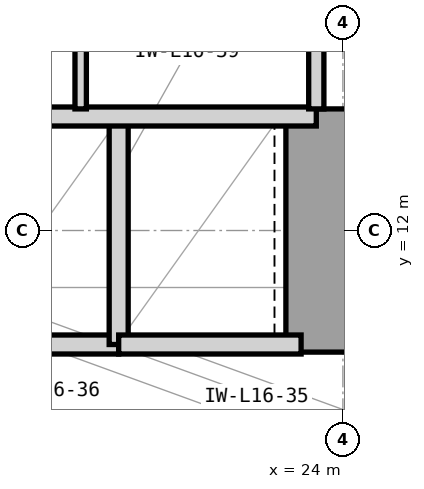
"""IFC4 building model, lengths in metres.
Left out: names, types, materials, properties, quantities, classifications, styles, units other than length and angle.
Written with IfcOpenShell. Run it as: python <this file> out.ifc"""

import sys

from ifc_helpers import new_model, si_unit, direction, frame, frame_2d, origin, place, context, subcontext, project, spatial, rectangle, extrude, element, save


model = new_model("IFC4")
c1 = context("Model", 3, precision=1e-05, world=origin(), true_north=direction((0.0, 1.0)))
c2 = subcontext(c1, "Body", "Model", "MODEL_VIEW")
j1 = project(units=[si_unit("LENGTHUNIT", "METRE"), si_unit("PLANEANGLEUNIT", "RADIAN")], contexts=[c1])
p1 = place(None, origin())
s1 = spatial("IfcSite", under=j1, at=p1, CompositionType="ELEMENT")
p2 = place(p1, origin())
s2 = spatial("IfcBuilding", under=s1, at=p2, CompositionType="ELEMENT")
p3 = place(p2, frame((0.0, 0.0, 72.0)))
s3 = spatial("IfcBuildingStorey", under=s2, at=p3, CompositionType="ELEMENT", Elevation=72.0)
p4 = place(p3, frame((23.65, 10.4, 0.0), z_axis=(0.0, 0.0, 1.0), x_axis=(0.0, 1.0, 0.0)))
e1 = element("IfcWall", 1, at=p4, inside=s3, PredefinedType="SHEAR", context=c2, shape_type="SweptSolid", body=[
    extrude(rectangle(XDim=3.2, YDim=0.8, at=frame_2d((1.6, 0.0))), origin(), (0.0, 0.0, 1.0), 4.2),
])
p5 = place(p3, frame((18.95, 10.5, 0.0), z_axis=(0.0, 0.0, 1.0), x_axis=(1.0, 0.0, 0.0)))
e2 = element("IfcWall", 2, at=p5, inside=s3, PredefinedType="PARTITIONING", context=c2, shape_type="SweptSolid", body=[
    extrude(rectangle(XDim=2.1, YDim=0.25, at=frame_2d((1.05, 0.0))), origin(), (0.0, 0.0, 1.0), 3.426),
])
p6 = place(p3, frame((21.05, 10.5, 0.0), z_axis=(0.0, 0.0, 1.0), x_axis=(0.0, 1.0, 0.0)))
e3 = element("IfcWall", 3, at=p6, inside=s3, PredefinedType="PARTITIONING", context=c2, shape_type="SweptSolid", body=[
    extrude(rectangle(XDim=3.0, YDim=0.25, at=frame_2d((1.5, 0.0))), origin(), (0.0, 0.0, 1.0), 3.97),
])
p7 = place(p3, frame((21.05, 10.5, 0.0), z_axis=(0.0, 0.0, 1.0), x_axis=(1.0, 0.0, 0.0)))
e4 = element("IfcWall", 4, at=p7, inside=s3, PredefinedType="PARTITIONING", context=c2, shape_type="SweptSolid", body=[
    extrude(rectangle(XDim=2.4, YDim=0.25, at=frame_2d((1.2, 0.0))), origin(), (0.0, 0.0, 1.0), 3.426),
])
p8 = place(p3, frame((14.7, 13.5, 0.0), z_axis=(0.0, 0.0, 1.0), x_axis=(1.0, 0.0, 0.0)))
e5 = element("IfcWall", 5, at=p8, inside=s3, PredefinedType="PARTITIONING", context=c2, shape_type="SweptSolid", body=[
    extrude(rectangle(XDim=8.95, YDim=0.25, at=frame_2d((4.475, 0.0))), origin(), (0.0, 0.0, 1.0), 3.426),
])
p9 = place(p3, frame((20.55, 13.6, 0.0), z_axis=(0.0, 0.0, 1.0), x_axis=(0.0, 1.0, 0.0)))
e6 = element("IfcWall", 6, at=p9, inside=s3, PredefinedType="PARTITIONING", context=c2, shape_type="SweptSolid", body=[
    extrude(rectangle(XDim=3.0, YDim=0.15, at=frame_2d((1.5, 0.0))), origin(), (0.0, 0.0, 1.0), 3.97),
])
p10 = place(p3, frame((23.65, 13.6, 0.0), z_axis=(0.0, 0.0, 1.0), x_axis=(0.0, 1.0, 0.0)))
e7 = element("IfcWall", 7, at=p10, inside=s3, PredefinedType="PARTITIONING", context=c2, shape_type="SweptSolid", body=[
    extrude(rectangle(XDim=3.0, YDim=0.2, at=frame_2d((1.5, 0.0))), origin(), (0.0, 0.0, 1.0), 3.97),
])
p11 = place(p10, frame((1.02, 0.0, 0.0)))
e8 = element("IfcOpeningElement", 8, at=p11, cuts=e7, PredefinedType="OPENING", context=c2, shape_type="SweptSolid", body=[
    extrude(rectangle(XDim=0.95, YDim=2.1, at=frame_2d((0.475, 1.05))), frame((0.0, 0.11, 0.0), z_axis=(0.0, -1.0, 0.0), x_axis=(1.0, 0.0, 0.0)), (0.0, 0.0, 1.0), 0.22),
])
save(model, sys.argv[1])
